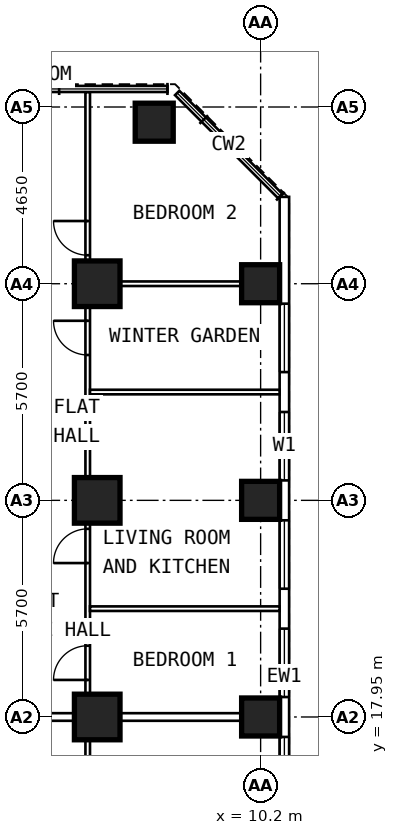
"""IFC4 building model, lengths in metres.
Left out: names, types, materials, properties, quantities, classifications, styles, units other than length and angle.
Written with IfcOpenShell. Run it as: python <this file> out.ifc"""

import sys

from ifc_helpers import new_model, si_unit, direction, frame, frame_2d, origin, origin_2d, place, context, subcontext, project, spatial, rectangle, extrude, element, fill, save


model = new_model("IFC4")
c1 = context("Model", 3, precision=1e-05, world=origin(), true_north=direction((0.0, 1.0)))
c2 = subcontext(c1, "Body", "Model", "MODEL_VIEW")
j1 = project(units=[si_unit("LENGTHUNIT", "METRE"), si_unit("PLANEANGLEUNIT", "RADIAN")], contexts=[c1])
p1 = place(None, origin())
s1 = spatial("IfcSite", under=j1, at=p1, CompositionType="ELEMENT")
p2 = place(p1, origin())
s2 = spatial("IfcBuilding", under=s1, at=p2, CompositionType="ELEMENT")
p3 = place(p2, frame((0.0, 0.0, 109.6)))
s3 = spatial("IfcBuildingStorey", under=s2, at=p3, CompositionType="ELEMENT", Elevation=109.6)
for number, where, z_axis, x_axis in (
    (1, (10.2, 17.95, 0.0), (0.0, 0.0, 1.0), (0.0, 1.0, 0.0)),
    (2, (10.2, 23.65, 0.0), (0.0, 0.0, 1.0), (0.0, 1.0, 0.0)),
    (3, (10.2, 29.35, 0.0), (0.0, 0.0, 1.0), (0.0, 1.0, 0.0)),
    (4, (7.4, 33.6, 0.0), (0.0, 0.0, 1.0), (0.0, 1.0, 0.0)),
):
    element("IfcColumn", number, at=place(p3, frame(where, z_axis=z_axis, x_axis=x_axis)), inside=s3, PredefinedType="COLUMN", context=c2, shape_type="SweptSolid", body=[
        extrude(rectangle(XDim=1.0, YDim=1.0, at=origin_2d()), origin(), (0.0, 0.0, 1.0), 3.6),
    ])
for number, where, z_axis, x_axis in (
    (5, (5.9, 17.95, 0.0), (0.0, 0.0, 1.0), (0.0, 1.0, 0.0)),
    (6, (5.9, 23.65, 0.0), (0.0, 0.0, 1.0), (0.0, 1.0, 0.0)),
    (7, (5.9, 29.35, 0.0), (0.0, 0.0, 1.0), (0.0, 1.0, 0.0)),
):
    element("IfcColumn", number, at=place(p3, frame(where, z_axis=z_axis, x_axis=x_axis)), inside=s3, PredefinedType="COLUMN", context=c2, shape_type="SweptSolid", body=[
        extrude(rectangle(XDim=1.2, YDim=1.2, at=origin_2d()), origin(), (0.0, 0.0, 1.0), 3.6),
    ])
p4 = place(p3, frame((10.825, 6.394, 0.0), z_axis=(0.0, 0.0, 1.0), x_axis=(0.0, 1.0, 0.0)))
e8 = element("IfcWall", 8, at=p4, inside=s3, PredefinedType="SOLIDWALL", context=c2, shape_type="SweptSolid", body=[
    extrude(rectangle(XDim=25.241, YDim=0.25, at=frame_2d((12.621, 0.0))), origin(), (0.0, 0.0, 1.0), 3.3),
])
p5 = place(p4, frame((0.681, 0.0, 0.8)))
e9 = element("IfcOpeningElement", 9, at=p5, cuts=e8, PredefinedType="OPENING", context=c2, shape_type="SweptSolid", body=[
    extrude(rectangle(XDim=1.8, YDim=1.8, at=frame_2d((0.9, 0.9))), frame((0.0, 0.137, 0.0), z_axis=(0.0, -1.0, 0.0), x_axis=(1.0, 0.0, 0.0)), (0.0, 0.0, 1.0), 0.274),
])
p6 = place(p4, frame((3.531, 0.0, 0.8)))
e10 = element("IfcOpeningElement", 10, at=p6, cuts=e8, PredefinedType="OPENING", context=c2, shape_type="SweptSolid", body=[
    extrude(rectangle(XDim=1.8, YDim=1.8, at=frame_2d((0.9, 0.9))), frame((0.0, 0.137, 0.0), z_axis=(0.0, -1.0, 0.0), x_axis=(1.0, 0.0, 0.0)), (0.0, 0.0, 1.0), 0.274),
])
p7 = place(p4, frame((6.381, 0.0, 0.8)))
e11 = element("IfcOpeningElement", 11, at=p7, cuts=e8, PredefinedType="OPENING", context=c2, shape_type="SweptSolid", body=[
    extrude(rectangle(XDim=1.8, YDim=1.8, at=frame_2d((0.9, 0.9))), frame((0.0, 0.137, 0.0), z_axis=(0.0, -1.0, 0.0), x_axis=(1.0, 0.0, 0.0)), (0.0, 0.0, 1.0), 0.274),
])
p8 = place(p4, frame((9.231, 0.0, 0.8)))
e12 = element("IfcOpeningElement", 12, at=p8, cuts=e8, PredefinedType="OPENING", context=c2, shape_type="SweptSolid", body=[
    extrude(rectangle(XDim=1.8, YDim=1.8, at=frame_2d((0.9, 0.9))), frame((0.0, 0.137, 0.0), z_axis=(0.0, -1.0, 0.0), x_axis=(1.0, 0.0, 0.0)), (0.0, 0.0, 1.0), 0.274),
])
p9 = place(p4, frame((12.081, 0.0, 0.8)))
e13 = element("IfcOpeningElement", 13, at=p9, cuts=e8, PredefinedType="OPENING", context=c2, shape_type="SweptSolid", body=[
    extrude(rectangle(XDim=1.8, YDim=1.8, at=frame_2d((0.9, 0.9))), frame((0.0, 0.137, 0.0), z_axis=(0.0, -1.0, 0.0), x_axis=(1.0, 0.0, 0.0)), (0.0, 0.0, 1.0), 0.274),
])
p10 = place(p4, frame((14.931, 0.0, 0.8)))
e14 = element("IfcOpeningElement", 14, at=p10, cuts=e8, PredefinedType="OPENING", context=c2, shape_type="SweptSolid", body=[
    extrude(rectangle(XDim=1.8, YDim=1.8, at=frame_2d((0.9, 0.9))), frame((0.0, 0.137, 0.0), z_axis=(0.0, -1.0, 0.0), x_axis=(1.0, 0.0, 0.0)), (0.0, 0.0, 1.0), 0.274),
])
p11 = place(p4, frame((17.781, 0.0, 0.8)))
e15 = element("IfcOpeningElement", 15, at=p11, cuts=e8, PredefinedType="OPENING", context=c2, shape_type="SweptSolid", body=[
    extrude(rectangle(XDim=1.8, YDim=1.8, at=frame_2d((0.9, 0.9))), frame((0.0, 0.137, 0.0), z_axis=(0.0, -1.0, 0.0), x_axis=(1.0, 0.0, 0.0)), (0.0, 0.0, 1.0), 0.274),
])
p12 = place(p4, frame((20.631, 0.0, 0.8)))
e16 = element("IfcOpeningElement", 16, at=p12, cuts=e8, PredefinedType="OPENING", context=c2, shape_type="SweptSolid", body=[
    extrude(rectangle(XDim=1.8, YDim=1.8, at=frame_2d((0.9, 0.9))), frame((0.0, 0.137, 0.0), z_axis=(0.0, -1.0, 0.0), x_axis=(1.0, 0.0, 0.0)), (0.0, 0.0, 1.0), 0.274),
])
p13 = place(p3, frame((5.65, 9.6, 0.0), z_axis=(0.0, 0.0, 1.0), x_axis=(0.0, 1.0, 0.0)))
e17 = element("IfcWall", 17, at=p13, inside=s3, PredefinedType="PARTITIONING", context=c2, shape_type="SweptSolid", body=[
    extrude(rectangle(XDim=8.1, YDim=0.12, at=frame_2d((4.05, 0.0))), origin(), (0.0, 0.0, 1.0), 3.3),
])
p14 = place(p13, frame((5.05, 0.0, 0.0)))
e18 = element("IfcOpeningElement", 18, at=p14, cuts=e17, PredefinedType="OPENING", context=c2, shape_type="SweptSolid", body=[
    extrude(rectangle(XDim=0.9, YDim=2.1, at=frame_2d((0.45, 1.05))), frame((0.0, 0.072, 0.0), z_axis=(0.0, -1.0, 0.0), x_axis=(1.0, 0.0, 0.0)), (0.0, 0.0, 1.0), 0.144),
])
p15 = place(p3, frame((5.65, 18.05, 0.0), z_axis=(0.0, 0.0, 1.0), x_axis=(0.0, 1.0, 0.0)))
e19 = element("IfcWall", 19, at=p15, inside=s3, PredefinedType="PARTITIONING", context=c2, shape_type="SweptSolid", body=[
    extrude(rectangle(XDim=16.345, YDim=0.12, at=frame_2d((8.172, 0.0))), origin(), (0.0, 0.0, 1.0), 3.3),
])
p16 = place(p15, frame((0.875, 0.0, 0.0)))
e20 = element("IfcOpeningElement", 20, at=p16, cuts=e19, PredefinedType="OPENING", context=c2, shape_type="SweptSolid", body=[
    extrude(rectangle(XDim=0.9, YDim=2.1, at=frame_2d((0.45, 1.05))), frame((0.0, 0.072, 0.0), z_axis=(0.0, -1.0, 0.0), x_axis=(1.0, 0.0, 0.0)), (0.0, 0.0, 1.0), 0.144),
])
p17 = place(p15, frame((3.95, 0.0, 0.0)))
e21 = element("IfcOpeningElement", 21, at=p17, cuts=e19, PredefinedType="OPENING", context=c2, shape_type="SweptSolid", body=[
    extrude(rectangle(XDim=0.9, YDim=2.1, at=frame_2d((0.45, 1.05))), frame((0.0, 0.072, 0.0), z_axis=(0.0, -1.0, 0.0), x_axis=(1.0, 0.0, 0.0)), (0.0, 0.0, 1.0), 0.144),
])
p18 = place(p15, frame((9.425, 0.0, 0.0)))
e22 = element("IfcOpeningElement", 22, at=p18, cuts=e19, PredefinedType="OPENING", context=c2, shape_type="SweptSolid", body=[
    extrude(rectangle(XDim=0.9, YDim=2.1, at=frame_2d((0.45, 1.05))), frame((0.0, 0.072, 0.0), z_axis=(0.0, -1.0, 0.0), x_axis=(1.0, 0.0, 0.0)), (0.0, 0.0, 1.0), 0.144),
])
p19 = place(p15, frame((12.05, 0.0, 0.0)))
e23 = element("IfcOpeningElement", 23, at=p19, cuts=e19, PredefinedType="OPENING", context=c2, shape_type="SweptSolid", body=[
    extrude(rectangle(XDim=0.9, YDim=2.1, at=frame_2d((0.45, 1.05))), frame((0.0, 0.072, 0.0), z_axis=(0.0, -1.0, 0.0), x_axis=(1.0, 0.0, 0.0)), (0.0, 0.0, 1.0), 0.144),
])
for number, where, z_axis, x_axis in (
    (24, (5.71, 20.8, 0.0), (0.0, 0.0, 1.0), (1.0, 0.0, 0.0)),
    (25, (5.71, 26.5, 0.0), (0.0, 0.0, 1.0), (1.0, 0.0, 0.0)),
):
    element("IfcWall", number, at=place(p3, frame(where, z_axis=z_axis, x_axis=x_axis)), inside=s3, PredefinedType="PARTITIONING", context=c2, shape_type="SweptSolid", body=[
        extrude(rectangle(XDim=4.99, YDim=0.12, at=frame_2d((2.495, 0.0))), origin(), (0.0, 0.0, 1.0), 3.3),
    ])
p20 = place(p3, frame((5.71, 29.35, 0.0), z_axis=(0.0, 0.0, 1.0), x_axis=(1.0, 0.0, 0.0)))
e26 = element("IfcWall", 26, at=p20, inside=s3, PredefinedType="PARTITIONING", context=c2, shape_type="SweptSolid", body=[
    extrude(rectangle(XDim=4.99, YDim=0.12, at=frame_2d((2.495, 0.0))), origin(), (0.0, 0.0, 1.0), 2.3),
])
p21 = place(p3, frame((2.1, 17.95, 0.0), z_axis=(0.0, 0.0, 1.0), x_axis=(1.0, 0.0, 0.0)))
e27 = element("IfcWall", 27, at=p21, inside=s3, PredefinedType="PARTITIONING", context=c2, shape_type="SweptSolid", body=[
    extrude(rectangle(XDim=8.6, YDim=0.2, at=frame_2d((4.3, 0.0))), origin(), (0.0, 0.0, 1.0), 3.3),
])
p22 = place(p8, origin())
e28 = element("IfcWindow", 28, at=p22, inside=s3, PartitioningType="SINGLE_PANEL", PredefinedType="WINDOW", context=c2, shape_type="SweptSolid", body=[
    extrude(rectangle(XDim=1.8, YDim=1.8, at=frame_2d((0.9, 0.9))), frame((0.0, 0.03, 0.0), z_axis=(0.0, -1.0, 0.0), x_axis=(1.0, 0.0, 0.0)), (0.0, 0.0, 1.0), 0.06),
])
fill(e12, e28)
p23 = place(p9, origin())
e29 = element("IfcWindow", 29, at=p23, inside=s3, PartitioningType="SINGLE_PANEL", PredefinedType="WINDOW", context=c2, shape_type="SweptSolid", body=[
    extrude(rectangle(XDim=1.8, YDim=1.8, at=frame_2d((0.9, 0.9))), frame((0.0, 0.03, 0.0), z_axis=(0.0, -1.0, 0.0), x_axis=(1.0, 0.0, 0.0)), (0.0, 0.0, 1.0), 0.06),
])
fill(e13, e29)
p24 = place(p10, origin())
e30 = element("IfcWindow", 30, at=p24, inside=s3, PartitioningType="SINGLE_PANEL", PredefinedType="WINDOW", context=c2, shape_type="SweptSolid", body=[
    extrude(rectangle(XDim=1.8, YDim=1.8, at=frame_2d((0.9, 0.9))), frame((0.0, 0.03, 0.0), z_axis=(0.0, -1.0, 0.0), x_axis=(1.0, 0.0, 0.0)), (0.0, 0.0, 1.0), 0.06),
])
fill(e14, e30)
p25 = place(p11, origin())
e31 = element("IfcWindow", 31, at=p25, inside=s3, PartitioningType="SINGLE_PANEL", PredefinedType="WINDOW", context=c2, shape_type="SweptSolid", body=[
    extrude(rectangle(XDim=1.8, YDim=1.8, at=frame_2d((0.9, 0.9))), frame((0.0, 0.03, 0.0), z_axis=(0.0, -1.0, 0.0), x_axis=(1.0, 0.0, 0.0)), (0.0, 0.0, 1.0), 0.06),
])
fill(e15, e31)
p26 = place(p12, origin())
e32 = element("IfcWindow", 32, at=p26, inside=s3, PartitioningType="SINGLE_PANEL", PredefinedType="WINDOW", context=c2, shape_type="SweptSolid", body=[
    extrude(rectangle(XDim=1.8, YDim=1.8, at=frame_2d((0.9, 0.9))), frame((0.0, 0.03, 0.0), z_axis=(0.0, -1.0, 0.0), x_axis=(1.0, 0.0, 0.0)), (0.0, 0.0, 1.0), 0.06),
])
fill(e16, e32)
p27 = place(p16, origin())
e33 = element("IfcDoor", 33, at=p27, inside=s3, OperationType="SINGLE_SWING_LEFT", PredefinedType="DOOR", context=c2, shape_type="SweptSolid", body=[
    extrude(rectangle(XDim=0.9, YDim=2.1, at=frame_2d((0.45, 1.05))), frame((0.0, 0.025, 0.0), z_axis=(0.0, -1.0, 0.0), x_axis=(1.0, 0.0, 0.0)), (0.0, 0.0, 1.0), 0.05),
])
fill(e20, e33)
p28 = place(p17, origin())
e34 = element("IfcDoor", 34, at=p28, inside=s3, OperationType="SINGLE_SWING_LEFT", PredefinedType="DOOR", context=c2, shape_type="SweptSolid", body=[
    extrude(rectangle(XDim=0.9, YDim=2.1, at=frame_2d((0.45, 1.05))), frame((0.0, 0.025, 0.0), z_axis=(0.0, -1.0, 0.0), x_axis=(1.0, 0.0, 0.0)), (0.0, 0.0, 1.0), 0.05),
])
fill(e21, e34)
p29 = place(p18, origin())
e35 = element("IfcDoor", 35, at=p29, inside=s3, OperationType="SINGLE_SWING_RIGHT", PredefinedType="DOOR", context=c2, shape_type="SweptSolid", body=[
    extrude(rectangle(XDim=0.9, YDim=2.1, at=frame_2d((0.45, 1.05))), frame((0.0, 0.025, 0.0), z_axis=(0.0, -1.0, 0.0), x_axis=(1.0, 0.0, 0.0)), (0.0, 0.0, 1.0), 0.05),
])
fill(e22, e35)
p30 = place(p19, origin())
e36 = element("IfcDoor", 36, at=p30, inside=s3, OperationType="SINGLE_SWING_RIGHT", PredefinedType="DOOR", context=c2, shape_type="SweptSolid", body=[
    extrude(rectangle(XDim=0.9, YDim=2.1, at=frame_2d((0.45, 1.05))), frame((0.0, 0.025, 0.0), z_axis=(0.0, -1.0, 0.0), x_axis=(1.0, 0.0, 0.0)), (0.0, 0.0, 1.0), 0.05),
])
fill(e23, e36)
save(model, sys.argv[1])
